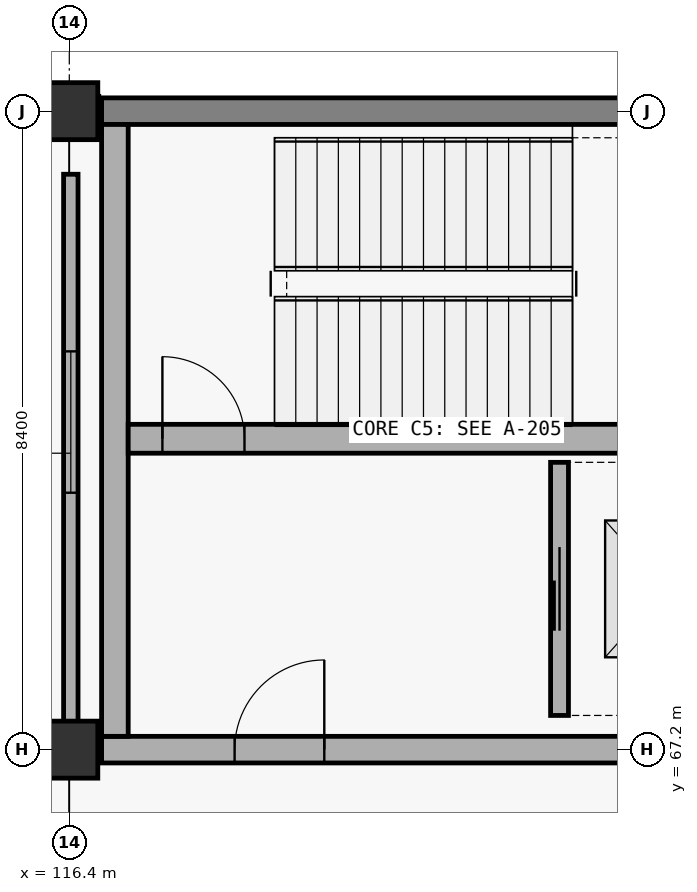
"""IFC4 building model, lengths in metres.
Left out: names, types, materials, properties, quantities, classifications, styles, units other than length and angle.
Written with IfcOpenShell. Run it as: python <this file> out.ifc"""

import sys

from ifc_helpers import new_model, si_unit, direction, frame, frame_2d, origin, origin_2d, place, context, subcontext, project, spatial, rectangle, extrude, element, fill, save


model = new_model("IFC4")
c1 = context("Model", 3, precision=1e-05, world=origin(), true_north=direction((0.0, 1.0)))
c2 = subcontext(c1, "Body", "Model", "MODEL_VIEW")
j1 = project(units=[si_unit("LENGTHUNIT", "METRE"), si_unit("PLANEANGLEUNIT", "RADIAN")], contexts=[c1])
p1 = place(None, origin())
s1 = spatial("IfcSite", under=j1, at=p1, CompositionType="ELEMENT")
p2 = place(p1, origin())
s2 = spatial("IfcBuilding", under=s1, at=p2, CompositionType="ELEMENT")
p3 = place(p2, frame((0.0, 0.0, 5.4)))
s3 = spatial("IfcBuildingStorey", under=s2, at=p3, CompositionType="ELEMENT", Elevation=5.4)
for number, where, z_axis, x_axis in (
    (1, (116.4, 67.2, 0.0), (0.0, 0.0, 1.0), (1.0, 0.0, 0.0)),
    (2, (116.4, 75.6, 0.0), (0.0, 0.0, 1.0), (1.0, 0.0, 0.0)),
):
    element("IfcColumn", number, at=place(p3, frame(where, z_axis=z_axis, x_axis=x_axis)), inside=s3, PredefinedType="COLUMN", context=c2, shape_type="SweptSolid", body=[
        extrude(rectangle(XDim=0.75, YDim=0.75, at=origin_2d()), origin(), (0.0, 0.0, 1.0), 5.1),
    ])
p4 = place(p3, frame((116.825, 67.2, 0.0), z_axis=(0.0, 0.0, 1.0), x_axis=(1.0, 0.0, 0.0)))
e3 = element("IfcWall", 3, at=p4, inside=s3, PredefinedType="SHEAR", context=c2, shape_type="SweptSolid", body=[
    extrude(rectangle(XDim=9.35, YDim=0.35, at=frame_2d((4.675, 0.0))), origin(), (0.0, 0.0, 1.0), 5.1),
])
p5 = place(p4, frame((1.75, 0.0, 0.0)))
e4 = element("IfcOpeningElement", 4, at=p5, cuts=e3, PredefinedType="OPENING", context=c2, shape_type="SweptSolid", body=[
    extrude(rectangle(XDim=1.18, YDim=2.24, at=frame_2d((0.59, 1.12))), frame((0.0, 0.185, 0.0), z_axis=(0.0, -1.0, 0.0), x_axis=(1.0, 0.0, 0.0)), (0.0, 0.0, 1.0), 0.37),
])
p6 = place(p3, frame((116.825, 75.6, 0.0), z_axis=(0.0, 0.0, 1.0), x_axis=(1.0, 0.0, 0.0)))
e5 = element("IfcWall", 5, at=p6, inside=s3, PredefinedType="SHEAR", context=c2, shape_type="SweptSolid", body=[
    extrude(rectangle(XDim=9.35, YDim=0.35, at=frame_2d((4.675, 0.0))), origin(), (0.0, 0.0, 1.0), 5.1),
])
p7 = place(p3, frame((117.0, 67.375, 0.0), z_axis=(0.0, 0.0, 1.0), x_axis=(0.0, 1.0, 0.0)))
e6 = element("IfcWall", 6, at=p7, inside=s3, PredefinedType="SHEAR", context=c2, shape_type="SweptSolid", body=[
    extrude(rectangle(XDim=8.05, YDim=0.35, at=frame_2d((4.025, 0.0))), origin(), (0.0, 0.0, 1.0), 5.1),
])
p8 = place(p3, frame((117.175, 71.29, 0.0), z_axis=(0.0, 0.0, 1.0), x_axis=(1.0, 0.0, 0.0)))
e7 = element("IfcWall", 7, at=p8, inside=s3, PredefinedType="SHEAR", context=c2, shape_type="SweptSolid", body=[
    extrude(rectangle(XDim=8.65, YDim=0.38, at=frame_2d((4.325, 0.0))), origin(), (0.0, 0.0, 1.0), 5.1),
])
p9 = place(p8, frame((0.45, 0.0, 0.0)))
e8 = element("IfcOpeningElement", 8, at=p9, cuts=e7, PredefinedType="OPENING", context=c2, shape_type="SweptSolid", body=[
    extrude(rectangle(XDim=1.08, YDim=2.18, at=frame_2d((0.54, 1.09))), frame((0.0, 0.2, 0.0), z_axis=(0.0, -1.0, 0.0), x_axis=(1.0, 0.0, 0.0)), (0.0, 0.0, 1.0), 0.4),
])
p10 = place(p3, frame((108.377, 75.6, 0.0), z_axis=(0.0, 0.0, 1.0), x_axis=(1.0, 0.0, 0.0)))
e9 = element("IfcWall", 9, at=p10, inside=s3, PredefinedType="SOLIDWALL", context=c2, shape_type="SweptSolid", body=[
    extrude(rectangle(XDim=8.411, YDim=0.39, at=frame_2d((4.206, 0.0))), origin(), (0.0, 0.0, 1.0), 3.82),
])
p11 = place(p10, frame((1.143, 0.0, 0.85)))
e10 = element("IfcOpeningElement", 10, at=p11, cuts=e9, PredefinedType="OPENING", context=c2, shape_type="SweptSolid", body=[
    extrude(rectangle(XDim=1.6, YDim=2.5, at=frame_2d((0.8, 1.25))), frame((0.0, 0.205, 0.0), z_axis=(0.0, -1.0, 0.0), x_axis=(1.0, 0.0, 0.0)), (0.0, 0.0, 1.0), 0.41),
])
p12 = place(p10, frame((4.043, 0.0, 0.85)))
e11 = element("IfcOpeningElement", 11, at=p12, cuts=e9, PredefinedType="OPENING", context=c2, shape_type="SweptSolid", body=[
    extrude(rectangle(XDim=1.95, YDim=2.3, at=frame_2d((0.975, 1.15))), frame((0.0, 0.205, 0.0), z_axis=(0.0, -1.0, 0.0), x_axis=(1.0, 0.0, 0.0)), (0.0, 0.0, 1.0), 0.41),
])
p13 = place(p3, frame((122.85, 67.65, 0.0), z_axis=(0.0, 0.0, 1.0), x_axis=(0.0, 1.0, 0.0)))
e12 = element("IfcWall", 12, at=p13, inside=s3, PredefinedType="PARTITIONING", context=c2, shape_type="SweptSolid", body=[
    extrude(rectangle(XDim=3.33, YDim=0.235, at=frame_2d((1.665, 0.0))), origin(), (0.0, 0.0, 1.0), 4.72),
])
p14 = place(p13, frame((1.115, 0.0, 0.0)))
e13 = element("IfcOpeningElement", 13, at=p14, cuts=e12, PredefinedType="OPENING", context=c2, shape_type="SweptSolid", body=[
    extrude(rectangle(XDim=1.1, YDim=2.2, at=frame_2d((0.55, 1.1))), frame((0.0, 0.127, 0.0), z_axis=(0.0, -1.0, 0.0), x_axis=(1.0, 0.0, 0.0)), (0.0, 0.0, 1.0), 0.255),
])
p15 = place(p3, frame((116.42, 67.43, 0.0), z_axis=(0.0, 0.0, 1.0), x_axis=(0.0, 1.0, 0.0)))
e14 = element("IfcWall", 14, at=p15, inside=s3, PredefinedType="PARTITIONING", context=c2, shape_type="SweptSolid", body=[
    extrude(rectangle(XDim=7.34, YDim=0.19, at=frame_2d((3.67, 0.0))), origin(), (0.0, 0.0, 1.0), 3.82),
])
p16 = place(p15, frame((3.15, 0.0, 0.9)))
e15 = element("IfcOpeningElement", 15, at=p16, cuts=e14, PredefinedType="OPENING", context=c2, shape_type="SweptSolid", body=[
    extrude(rectangle(XDim=1.86, YDim=1.28, at=frame_2d((0.93, 0.64))), frame((0.0, 0.105, 0.0), z_axis=(0.0, -1.0, 0.0), x_axis=(1.0, 0.0, 0.0)), (0.0, 0.0, 1.0), 0.21),
])
p17 = place(p9, origin())
e16 = element("IfcDoor", 16, at=p17, inside=s3, OperationType="SINGLE_SWING_LEFT", PredefinedType="DOOR", context=c2, shape_type="SweptSolid", body=[
    extrude(rectangle(XDim=1.08, YDim=2.18, at=frame_2d((0.54, 1.09))), frame((0.0, 0.025, 0.0), z_axis=(0.0, -1.0, 0.0), x_axis=(1.0, 0.0, 0.0)), (0.0, 0.0, 1.0), 0.05),
])
fill(e8, e16)
p18 = place(p5, origin())
e17 = element("IfcDoor", 17, at=p18, inside=s3, OperationType="SINGLE_SWING_RIGHT", PredefinedType="DOOR", context=c2, shape_type="SweptSolid", body=[
    extrude(rectangle(XDim=1.18, YDim=2.24, at=frame_2d((0.59, 1.12))), frame((0.0, 0.025, 0.0), z_axis=(0.0, -1.0, 0.0), x_axis=(1.0, 0.0, 0.0)), (0.0, 0.0, 1.0), 0.05),
])
fill(e4, e17)
p19 = place(p14, origin())
e18 = element("IfcDoor", 18, at=p19, inside=s3, OperationType="SLIDING_TO_LEFT", PredefinedType="DOOR", context=c2, shape_type="SweptSolid", body=[
    extrude(rectangle(XDim=1.1, YDim=2.2, at=frame_2d((0.55, 1.1))), frame((0.0, 0.025, 0.0), z_axis=(0.0, -1.0, 0.0), x_axis=(1.0, 0.0, 0.0)), (0.0, 0.0, 1.0), 0.05),
])
fill(e13, e18)
p20 = place(p16, origin())
e19 = element("IfcWindow", 19, at=p20, inside=s3, PartitioningType="SINGLE_PANEL", PredefinedType="WINDOW", context=c2, shape_type="SweptSolid", body=[
    extrude(rectangle(XDim=1.86, YDim=1.28, at=frame_2d((0.93, 0.64))), frame((0.0, 0.03, 0.0), z_axis=(0.0, -1.0, 0.0), x_axis=(1.0, 0.0, 0.0)), (0.0, 0.0, 1.0), 0.06),
])
fill(e15, e19)
save(model, sys.argv[1])
